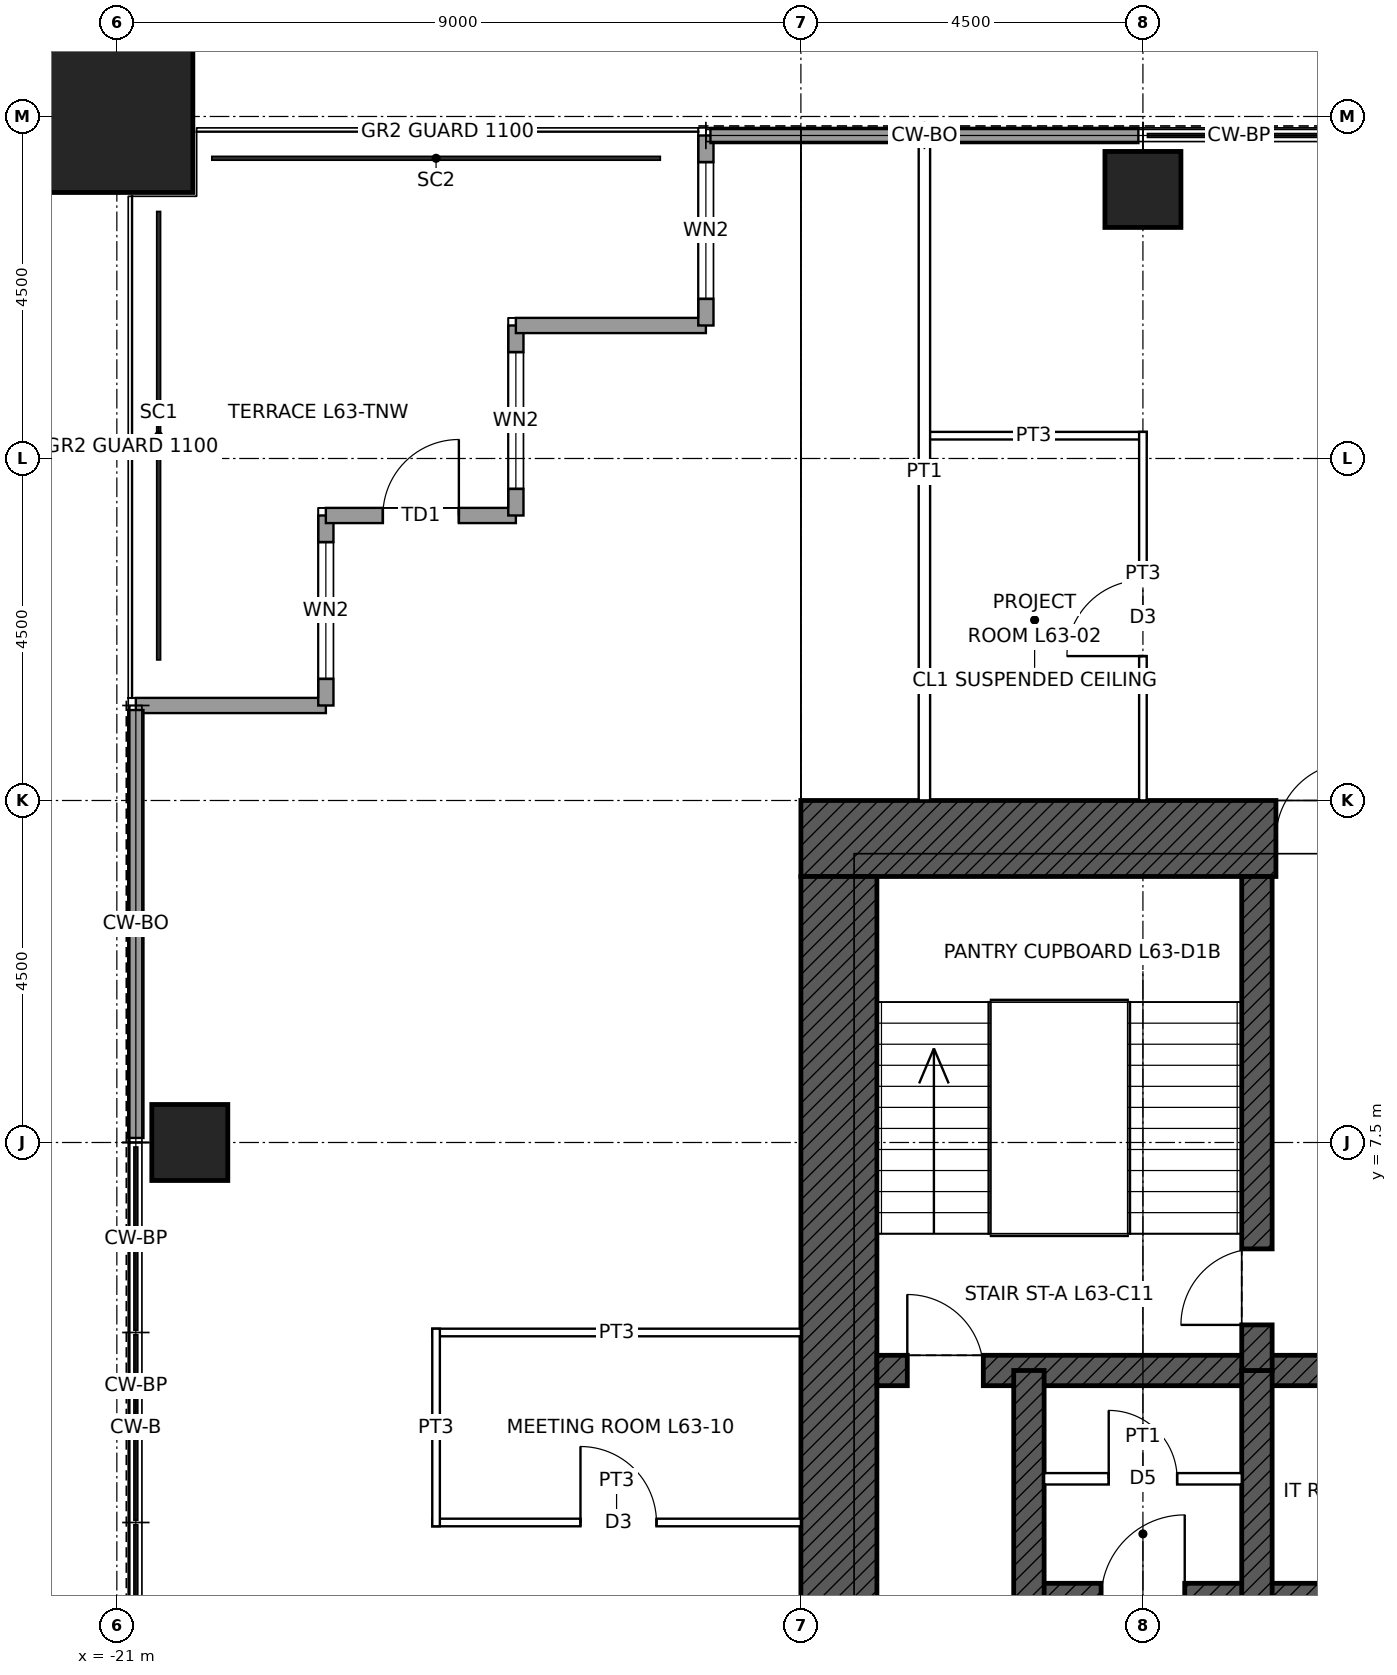
"""IFC4 building model, lengths in metres.
Left out: names, types, materials, properties, quantities, classifications, styles, units other than length and angle.
Written with IfcOpenShell. Run it as: python <this file> out.ifc"""

import sys

from ifc_helpers import new_model, si_unit, direction, frame, frame_2d, origin, origin_2d, place, context, subcontext, project, spatial, rectangle, hollow_rectangle, extrude, element, fill, save


model = new_model("IFC4")
c1 = context("Model", 3, precision=1e-05, world=origin(), true_north=direction((0.0, 1.0)))
c2 = subcontext(c1, "Body", "Model", "MODEL_VIEW")
j1 = project(units=[si_unit("LENGTHUNIT", "METRE"), si_unit("PLANEANGLEUNIT", "RADIAN")], contexts=[c1])
p1 = place(None, origin())
s1 = spatial("IfcSite", under=j1, at=p1, CompositionType="ELEMENT")
p2 = place(p1, origin())
s2 = spatial("IfcBuilding", under=s1, at=p2, CompositionType="ELEMENT")
p3 = place(p2, frame((0.0, 0.0, 287.9)))
s3 = spatial("IfcBuildingStorey", under=s2, at=p3, CompositionType="ELEMENT", Elevation=287.9)
p4 = place(p3, frame((-21.0, 21.0, 0.0), z_axis=(0.0, 0.0, 1.0), x_axis=(1.0, 0.0, 0.0)))
e1 = element("IfcColumn", 1, at=p4, inside=s3, PredefinedType="COLUMN", context=c2, shape_type="SweptSolid", body=[
    extrude(hollow_rectangle(XDim=2.0, YDim=2.0, WallThickness=0.095, at=origin_2d()), origin(), (0.0, 0.0, 1.0), 4.0),
])
for number, where, z_axis, x_axis in (
    (2, (-7.5, 20.04, 0.0), (0.0, 0.0, 1.0), (1.0, 0.0, 0.0)),
    (3, (-20.04, 7.5, 0.0), (0.0, 0.0, 1.0), (1.0, 0.0, 0.0)),
):
    element("IfcColumn", number, at=place(p3, frame(where, z_axis=z_axis, x_axis=x_axis)), inside=s3, PredefinedType="COLUMN", context=c2, shape_type="SweptSolid", body=[
        extrude(hollow_rectangle(XDim=1.0, YDim=1.0, WallThickness=0.075, at=origin_2d()), origin(), (0.0, 0.0, 1.0), 4.0),
    ])
p5 = place(p3, frame((-12.0, 11.5, 0.0), z_axis=(0.0, 0.0, 1.0), x_axis=(1.0, 0.0, 0.0)))
e4 = element("IfcWall", 4, at=p5, inside=s3, PredefinedType="SHEAR", context=c2, shape_type="SweptSolid", body=[
    extrude(rectangle(XDim=24.0, YDim=1.0, at=frame_2d((12.0, 0.0))), origin(), (0.0, 0.0, 1.0), 4.0),
])
p6 = place(p5, frame((6.25, 0.0, 0.0)))
e5 = element("IfcOpeningElement", 5, at=p6, cuts=e4, PredefinedType="OPENING", context=c2, shape_type="SweptSolid", body=[
    extrude(rectangle(XDim=1.0, YDim=2.4, at=frame_2d((0.5, 1.2))), frame((0.0, 0.51, 0.0), z_axis=(0.0, -1.0, 0.0), x_axis=(1.0, 0.0, 0.0)), (0.0, 0.0, 1.0), 1.02),
])
p7 = place(p5, frame((16.75, 0.0, 0.0)))
e6 = element("IfcOpeningElement", 6, at=p7, cuts=e4, PredefinedType="OPENING", context=c2, shape_type="SweptSolid", body=[
    extrude(rectangle(XDim=1.0, YDim=2.4, at=frame_2d((0.5, 1.2))), frame((0.0, 0.51, 0.0), z_axis=(0.0, -1.0, 0.0), x_axis=(1.0, 0.0, 0.0)), (0.0, 0.0, 1.0), 1.02),
])
p8 = place(p3, frame((-11.5, -11.0, 0.0), z_axis=(0.0, 0.0, 1.0), x_axis=(0.0, 1.0, 0.0)))
e7 = element("IfcWall", 7, at=p8, inside=s3, PredefinedType="SHEAR", context=c2, shape_type="SweptSolid", body=[
    extrude(rectangle(XDim=22.0, YDim=1.0, at=frame_2d((11.0, 0.0))), origin(), (0.0, 0.0, 1.0), 4.0),
])
p9 = place(p8, frame((10.5, 0.0, 0.0)))
e8 = element("IfcOpeningElement", 8, at=p9, cuts=e7, PredefinedType="OPENING", context=c2, shape_type="SweptSolid", body=[
    extrude(rectangle(XDim=1.0, YDim=2.4, at=frame_2d((0.5, 1.2))), frame((0.0, 0.51, 0.0), z_axis=(0.0, -1.0, 0.0), x_axis=(1.0, 0.0, 0.0)), (0.0, 0.0, 1.0), 1.02),
])
p10 = place(p3, frame((-11.0, 4.5, 0.0), z_axis=(0.0, 0.0, 1.0), x_axis=(1.0, 0.0, 0.0)))
e9 = element("IfcWall", 9, at=p10, inside=s3, PredefinedType="SHEAR", context=c2, shape_type="SweptSolid", body=[
    extrude(rectangle(XDim=22.0, YDim=0.4, at=frame_2d((11.0, 0.0))), origin(), (0.0, 0.0, 1.0), 4.0),
])
p11 = place(p10, frame((0.4, 0.0, 0.0)))
e10 = element("IfcOpeningElement", 10, at=p11, cuts=e9, PredefinedType="OPENING", context=c2, shape_type="SweptSolid", body=[
    extrude(rectangle(XDim=1.0, YDim=2.1, at=frame_2d((0.5, 1.05))), frame((0.0, 0.21, 0.0), z_axis=(0.0, -1.0, 0.0), x_axis=(1.0, 0.0, 0.0)), (0.0, 0.0, 1.0), 0.42),
])
p12 = place(p10, frame((20.6, 0.0, 0.0)))
e11 = element("IfcOpeningElement", 11, at=p12, cuts=e9, PredefinedType="OPENING", context=c2, shape_type="SweptSolid", body=[
    extrude(rectangle(XDim=1.0, YDim=2.1, at=frame_2d((0.5, 1.05))), frame((0.0, 0.21, 0.0), z_axis=(0.0, -1.0, 0.0), x_axis=(1.0, 0.0, 0.0)), (0.0, 0.0, 1.0), 0.42),
])
p13 = place(p3, frame((-9.0, 1.5, 0.0), z_axis=(0.0, 0.0, 1.0), x_axis=(1.0, 0.0, 0.0)))
e12 = element("IfcWall", 12, at=p13, inside=s3, PredefinedType="SHEAR", context=c2, shape_type="SweptSolid", body=[
    extrude(rectangle(XDim=18.0, YDim=0.4, at=frame_2d((9.0, 0.0))), origin(), (0.0, 0.0, 1.0), 4.0),
])
p14 = place(p13, frame((0.95, 0.0, 0.0)))
e13 = element("IfcOpeningElement", 13, at=p14, cuts=e12, PredefinedType="OPENING", context=c2, shape_type="SweptSolid", body=[
    extrude(rectangle(XDim=1.1, YDim=2.1, at=frame_2d((0.55, 1.05))), frame((0.0, 0.21, 0.0), z_axis=(0.0, -1.0, 0.0), x_axis=(1.0, 0.0, 0.0)), (0.0, 0.0, 1.0), 0.42),
])
p15 = place(p13, frame((3.95, 0.0, 0.0)))
e14 = element("IfcOpeningElement", 14, at=p15, cuts=e12, PredefinedType="OPENING", context=c2, shape_type="SweptSolid", body=[
    extrude(rectangle(XDim=1.1, YDim=2.1, at=frame_2d((0.55, 1.05))), frame((0.0, 0.21, 0.0), z_axis=(0.0, -1.0, 0.0), x_axis=(1.0, 0.0, 0.0)), (0.0, 0.0, 1.0), 0.42),
])
p16 = place(p13, frame((6.95, 0.0, 0.0)))
e15 = element("IfcOpeningElement", 15, at=p16, cuts=e12, PredefinedType="OPENING", context=c2, shape_type="SweptSolid", body=[
    extrude(rectangle(XDim=1.1, YDim=2.1, at=frame_2d((0.55, 1.05))), frame((0.0, 0.21, 0.0), z_axis=(0.0, -1.0, 0.0), x_axis=(1.0, 0.0, 0.0)), (0.0, 0.0, 1.0), 0.42),
])
p17 = place(p13, frame((9.95, 0.0, 0.0)))
e16 = element("IfcOpeningElement", 16, at=p17, cuts=e12, PredefinedType="OPENING", context=c2, shape_type="SweptSolid", body=[
    extrude(rectangle(XDim=1.1, YDim=2.1, at=frame_2d((0.55, 1.05))), frame((0.0, 0.21, 0.0), z_axis=(0.0, -1.0, 0.0), x_axis=(1.0, 0.0, 0.0)), (0.0, 0.0, 1.0), 0.42),
])
p18 = place(p13, frame((12.95, 0.0, 0.0)))
e17 = element("IfcOpeningElement", 17, at=p18, cuts=e12, PredefinedType="OPENING", context=c2, shape_type="SweptSolid", body=[
    extrude(rectangle(XDim=1.1, YDim=2.1, at=frame_2d((0.55, 1.05))), frame((0.0, 0.21, 0.0), z_axis=(0.0, -1.0, 0.0), x_axis=(1.0, 0.0, 0.0)), (0.0, 0.0, 1.0), 0.42),
])
p19 = place(p13, frame((15.95, 0.0, 0.0)))
e18 = element("IfcOpeningElement", 18, at=p19, cuts=e12, PredefinedType="OPENING", context=c2, shape_type="SweptSolid", body=[
    extrude(rectangle(XDim=1.1, YDim=2.1, at=frame_2d((0.55, 1.05))), frame((0.0, 0.21, 0.0), z_axis=(0.0, -1.0, 0.0), x_axis=(1.0, 0.0, 0.0)), (0.0, 0.0, 1.0), 0.42),
])
for number, where, z_axis, x_axis in (
    (19, (-9.0, 1.5, 0.0), (0.0, 0.0, 1.0), (0.0, 1.0, 0.0)),
    (20, (-6.0, 1.5, 0.0), (0.0, 0.0, 1.0), (0.0, 1.0, 0.0)),
):
    element("IfcWall", number, at=place(p3, frame(where, z_axis=z_axis, x_axis=x_axis)), inside=s3, PredefinedType="SHEAR", context=c2, shape_type="SweptSolid", body=[
        extrude(rectangle(XDim=3.0, YDim=0.4, at=frame_2d((1.5, 0.0))), origin(), (0.0, 0.0, 1.0), 4.0),
    ])
p20 = place(p3, frame((-6.0, 4.5, 0.0), z_axis=(0.0, 0.0, 1.0), x_axis=(0.0, 1.0, 0.0)))
e21 = element("IfcWall", 21, at=p20, inside=s3, PredefinedType="SHEAR", context=c2, shape_type="SweptSolid", body=[
    extrude(rectangle(XDim=6.5, YDim=0.4, at=frame_2d((3.25, 0.0))), origin(), (0.0, 0.0, 1.0), 4.0),
])
p21 = place(p20, frame((0.6, 0.0, 0.0)))
e22 = element("IfcOpeningElement", 22, at=p21, cuts=e21, PredefinedType="OPENING", context=c2, shape_type="SweptSolid", body=[
    extrude(rectangle(XDim=1.0, YDim=2.1, at=frame_2d((0.5, 1.05))), frame((0.0, 0.21, 0.0), z_axis=(0.0, -1.0, 0.0), x_axis=(1.0, 0.0, 0.0)), (0.0, 0.0, 1.0), 0.42),
])
p22 = place(p3, frame((-20.75, 13.25, 0.0), z_axis=(0.0, 0.0, 1.0), x_axis=(1.0, 0.0, 0.0)))
e23 = element("IfcWall", 23, at=p22, inside=s3, PredefinedType="SOLIDWALL", context=c2, shape_type="SweptSolid", body=[
    extrude(rectangle(XDim=2.5, YDim=0.2, at=frame_2d((1.25, 0.0))), origin(), (0.0, 0.0, 1.0), 3.85),
])
p23 = place(p3, frame((-18.25, 13.25, 0.0), z_axis=(0.0, 0.0, 1.0), x_axis=(0.0, 1.0, 0.0)))
e24 = element("IfcWall", 24, at=p23, inside=s3, PredefinedType="SOLIDWALL", context=c2, shape_type="SweptSolid", body=[
    extrude(rectangle(XDim=2.5, YDim=0.2, at=frame_2d((1.25, 0.0))), origin(), (0.0, 0.0, 1.0), 3.85),
])
p24 = place(p23, frame((0.35, 0.0, 0.3)))
e25 = element("IfcOpeningElement", 25, at=p24, cuts=e24, PredefinedType="OPENING", context=c2, shape_type="SweptSolid", body=[
    extrude(rectangle(XDim=1.8, YDim=2.4, at=frame_2d((0.9, 1.2))), frame((0.0, 0.11, 0.0), z_axis=(0.0, -1.0, 0.0), x_axis=(1.0, 0.0, 0.0)), (0.0, 0.0, 1.0), 0.22),
])
p25 = place(p3, frame((-18.25, 15.75, 0.0), z_axis=(0.0, 0.0, 1.0), x_axis=(1.0, 0.0, 0.0)))
e26 = element("IfcWall", 26, at=p25, inside=s3, PredefinedType="SOLIDWALL", context=c2, shape_type="SweptSolid", body=[
    extrude(rectangle(XDim=2.5, YDim=0.2, at=frame_2d((1.25, 0.0))), origin(), (0.0, 0.0, 1.0), 3.317),
])
p26 = place(p25, frame((0.75, 0.0, 0.0)))
e27 = element("IfcOpeningElement", 27, at=p26, cuts=e26, PredefinedType="OPENING", context=c2, shape_type="SweptSolid", body=[
    extrude(rectangle(XDim=1.0, YDim=2.4, at=frame_2d((0.5, 1.2))), frame((0.0, 0.11, 0.0), z_axis=(0.0, -1.0, 0.0), x_axis=(1.0, 0.0, 0.0)), (0.0, 0.0, 1.0), 0.22),
])
p27 = place(p3, frame((-15.75, 15.75, 0.0), z_axis=(0.0, 0.0, 1.0), x_axis=(0.0, 1.0, 0.0)))
e28 = element("IfcWall", 28, at=p27, inside=s3, PredefinedType="SOLIDWALL", context=c2, shape_type="SweptSolid", body=[
    extrude(rectangle(XDim=2.5, YDim=0.2, at=frame_2d((1.25, 0.0))), origin(), (0.0, 0.0, 1.0), 3.85),
])
p28 = place(p27, frame((0.35, 0.0, 0.3)))
e29 = element("IfcOpeningElement", 29, at=p28, cuts=e28, PredefinedType="OPENING", context=c2, shape_type="SweptSolid", body=[
    extrude(rectangle(XDim=1.8, YDim=2.4, at=frame_2d((0.9, 1.2))), frame((0.0, 0.11, 0.0), z_axis=(0.0, -1.0, 0.0), x_axis=(1.0, 0.0, 0.0)), (0.0, 0.0, 1.0), 0.22),
])
p29 = place(p3, frame((-15.75, 18.25, 0.0), z_axis=(0.0, 0.0, 1.0), x_axis=(1.0, 0.0, 0.0)))
e30 = element("IfcWall", 30, at=p29, inside=s3, PredefinedType="SOLIDWALL", context=c2, shape_type="SweptSolid", body=[
    extrude(rectangle(XDim=2.5, YDim=0.2, at=frame_2d((1.25, 0.0))), origin(), (0.0, 0.0, 1.0), 3.85),
])
p30 = place(p3, frame((-13.25, 18.25, 0.0), z_axis=(0.0, 0.0, 1.0), x_axis=(0.0, 1.0, 0.0)))
e31 = element("IfcWall", 31, at=p30, inside=s3, PredefinedType="SOLIDWALL", context=c2, shape_type="SweptSolid", body=[
    extrude(rectangle(XDim=2.5, YDim=0.2, at=frame_2d((1.25, 0.0))), origin(), (0.0, 0.0, 1.0), 3.85),
])
p31 = place(p30, frame((0.35, 0.0, 0.3)))
e32 = element("IfcOpeningElement", 32, at=p31, cuts=e31, PredefinedType="OPENING", context=c2, shape_type="SweptSolid", body=[
    extrude(rectangle(XDim=1.8, YDim=2.4, at=frame_2d((0.9, 1.2))), frame((0.0, 0.11, 0.0), z_axis=(0.0, -1.0, 0.0), x_axis=(1.0, 0.0, 0.0)), (0.0, 0.0, 1.0), 0.22),
])
for number, where, z_axis, x_axis in (
    (33, (-13.19, 20.75, 0.0), (0.0, 0.0, 1.0), (1.0, 0.0, 0.0)),
    (34, (-10.345, 20.75, 0.0), (0.0, 0.0, 1.0), (1.0, 0.0, 0.0)),
    (35, (-20.75, 7.56, 0.0), (0.0, 0.0, 1.0), (0.0, 1.0, 0.0)),
    (36, (-20.75, 10.405, 0.0), (0.0, 0.0, 1.0), (0.0, 1.0, 0.0)),
):
    element("IfcWall", number, at=place(p3, frame(where, z_axis=z_axis, x_axis=x_axis)), inside=s3, PredefinedType="SOLIDWALL", context=c2, shape_type="SweptSolid", body=[
        extrude(rectangle(XDim=2.785, YDim=0.2, at=frame_2d((1.393, 0.0))), origin(), (0.0, 0.0, 1.0), 3.85),
    ])
p32 = place(p3, frame((-16.85, 2.5, 0.0), z_axis=(0.0, 0.0, 1.0), x_axis=(1.0, 0.0, 0.0)))
e37 = element("IfcWall", 37, at=p32, inside=s3, PredefinedType="PARTITIONING", context=c2, shape_type="SweptSolid", body=[
    extrude(rectangle(XDim=4.85, YDim=0.1, at=frame_2d((2.425, 0.0))), origin(), (0.0, 0.0, 1.0), 3.85),
])
p33 = place(p32, frame((1.95, 0.0, 0.0)))
e38 = element("IfcOpeningElement", 38, at=p33, cuts=e37, PredefinedType="OPENING", context=c2, shape_type="SweptSolid", body=[
    extrude(rectangle(XDim=1.0, YDim=2.1, at=frame_2d((0.5, 1.05))), frame((0.0, 0.06, 0.0), z_axis=(0.0, -1.0, 0.0), x_axis=(1.0, 0.0, 0.0)), (0.0, 0.0, 1.0), 0.12),
])
p34 = place(p3, frame((-16.85, 5.0, 0.0), z_axis=(0.0, 0.0, 1.0), x_axis=(1.0, 0.0, 0.0)))
e39 = element("IfcWall", 39, at=p34, inside=s3, PredefinedType="PARTITIONING", context=c2, shape_type="SweptSolid", body=[
    extrude(rectangle(XDim=4.85, YDim=0.1, at=frame_2d((2.425, 0.0))), origin(), (0.0, 0.0, 1.0), 3.85),
])
p35 = place(p3, frame((-10.425, 16.8, 0.0), z_axis=(0.0, 0.0, 1.0), x_axis=(1.0, 0.0, 0.0)))
e40 = element("IfcWall", 40, at=p35, inside=s3, PredefinedType="PARTITIONING", context=c2, shape_type="SweptSolid", body=[
    extrude(rectangle(XDim=2.975, YDim=0.1, at=frame_2d((1.488, 0.0))), origin(), (0.0, 0.0, 1.0), 3.85),
])
p36 = place(p3, frame((-16.8, 2.45, 0.0), z_axis=(0.0, 0.0, 1.0), x_axis=(0.0, 1.0, 0.0)))
e41 = element("IfcWall", 41, at=p36, inside=s3, PredefinedType="PARTITIONING", context=c2, shape_type="SweptSolid", body=[
    extrude(rectangle(XDim=2.6, YDim=0.1, at=frame_2d((1.3, 0.0))), origin(), (0.0, 0.0, 1.0), 3.85),
])
p37 = place(p3, frame((-10.375, 12.0, 0.0), z_axis=(0.0, 0.0, 1.0), x_axis=(0.0, 1.0, 0.0)))
e42 = element("IfcWall", 42, at=p37, inside=s3, PredefinedType="PARTITIONING", context=c2, shape_type="SweptSolid", body=[
    extrude(rectangle(XDim=8.65, YDim=0.15, at=frame_2d((4.325, 0.0))), origin(), (0.0, 0.0, 1.0), 3.85),
])
p38 = place(p3, frame((-7.5, 12.0, 0.0), z_axis=(0.0, 0.0, 1.0), x_axis=(0.0, 1.0, 0.0)))
e43 = element("IfcWall", 43, at=p38, inside=s3, PredefinedType="PARTITIONING", context=c2, shape_type="SweptSolid", body=[
    extrude(rectangle(XDim=4.85, YDim=0.1, at=frame_2d((2.425, 0.0))), origin(), (0.0, 0.0, 1.0), 3.243),
])
p39 = place(p38, frame((1.9, 0.0, 0.0)))
e44 = element("IfcOpeningElement", 44, at=p39, cuts=e43, PredefinedType="OPENING", context=c2, shape_type="SweptSolid", body=[
    extrude(rectangle(XDim=1.0, YDim=2.1, at=frame_2d((0.5, 1.05))), frame((0.0, 0.06, 0.0), z_axis=(0.0, -1.0, 0.0), x_axis=(1.0, 0.0, 0.0)), (0.0, 0.0, 1.0), 0.12),
])
p40 = place(p3, frame((-8.8, 3.075, 0.0), z_axis=(0.0, 0.0, 1.0), x_axis=(1.0, 0.0, 0.0)))
e45 = element("IfcWall", 45, at=p40, inside=s3, PredefinedType="PARTITIONING", context=c2, shape_type="SweptSolid", body=[
    extrude(rectangle(XDim=2.6, YDim=0.15, at=frame_2d((1.3, 0.0))), origin(), (0.0, 0.0, 1.0), 3.75),
])
p41 = place(p40, frame((0.85, 0.0, 0.0)))
e46 = element("IfcOpeningElement", 46, at=p41, cuts=e45, PredefinedType="OPENING", context=c2, shape_type="SweptSolid", body=[
    extrude(rectangle(XDim=0.9, YDim=2.1, at=frame_2d((0.45, 1.05))), frame((0.0, 0.085, 0.0), z_axis=(0.0, -1.0, 0.0), x_axis=(1.0, 0.0, 0.0)), (0.0, 0.0, 1.0), 0.17),
])
p42 = place(p24, origin())
e47 = element("IfcWindow", 47, at=p42, inside=s3, PartitioningType="SINGLE_PANEL", PredefinedType="WINDOW", context=c2, shape_type="SweptSolid", body=[
    extrude(rectangle(XDim=1.8, YDim=2.4, at=frame_2d((0.9, 1.2))), frame((0.0, 0.03, 0.0), z_axis=(0.0, -1.0, 0.0), x_axis=(1.0, 0.0, 0.0)), (0.0, 0.0, 1.0), 0.06),
])
fill(e25, e47)
p43 = place(p26, origin())
e48 = element("IfcDoor", 48, at=p43, inside=s3, OperationType="SINGLE_SWING_RIGHT", PredefinedType="DOOR", context=c2, shape_type="SweptSolid", body=[
    extrude(rectangle(XDim=1.0, YDim=2.4, at=frame_2d((0.5, 1.2))), frame((0.0, 0.025, 0.0), z_axis=(0.0, -1.0, 0.0), x_axis=(1.0, 0.0, 0.0)), (0.0, 0.0, 1.0), 0.05),
])
fill(e27, e48)
p44 = place(p28, origin())
e49 = element("IfcWindow", 49, at=p44, inside=s3, PartitioningType="SINGLE_PANEL", PredefinedType="WINDOW", context=c2, shape_type="SweptSolid", body=[
    extrude(rectangle(XDim=1.8, YDim=2.4, at=frame_2d((0.9, 1.2))), frame((0.0, 0.03, 0.0), z_axis=(0.0, -1.0, 0.0), x_axis=(1.0, 0.0, 0.0)), (0.0, 0.0, 1.0), 0.06),
])
fill(e29, e49)
p45 = place(p31, origin())
e50 = element("IfcWindow", 50, at=p45, inside=s3, PartitioningType="SINGLE_PANEL", PredefinedType="WINDOW", context=c2, shape_type="SweptSolid", body=[
    extrude(rectangle(XDim=1.8, YDim=2.4, at=frame_2d((0.9, 1.2))), frame((0.0, 0.03, 0.0), z_axis=(0.0, -1.0, 0.0), x_axis=(1.0, 0.0, 0.0)), (0.0, 0.0, 1.0), 0.06),
])
fill(e32, e50)
p46 = place(p11, origin())
e51 = element("IfcDoor", 51, at=p46, inside=s3, OperationType="SINGLE_SWING_LEFT", PredefinedType="DOOR", context=c2, shape_type="SweptSolid", body=[
    extrude(rectangle(XDim=1.0, YDim=2.1, at=frame_2d((0.5, 1.05))), frame((0.0, 0.025, 0.0), z_axis=(0.0, -1.0, 0.0), x_axis=(1.0, 0.0, 0.0)), (0.0, 0.0, 1.0), 0.05),
])
fill(e10, e51)
p47 = place(p21, origin())
e52 = element("IfcDoor", 52, at=p47, inside=s3, OperationType="SINGLE_SWING_LEFT", PredefinedType="DOOR", context=c2, shape_type="SweptSolid", body=[
    extrude(rectangle(XDim=1.0, YDim=2.1, at=frame_2d((0.5, 1.05))), frame((0.0, 0.025, 0.0), z_axis=(0.0, -1.0, 0.0), x_axis=(1.0, 0.0, 0.0)), (0.0, 0.0, 1.0), 0.05),
])
fill(e22, e52)
p48 = place(p6, origin())
e53 = element("IfcDoor", 53, at=p48, inside=s3, OperationType="SINGLE_SWING_RIGHT", PredefinedType="DOOR", context=c2, shape_type="SweptSolid", body=[
    extrude(rectangle(XDim=1.0, YDim=2.4, at=frame_2d((0.5, 1.2))), frame((0.0, 0.485, 0.0), z_axis=(0.0, -1.0, 0.0), x_axis=(1.0, 0.0, 0.0)), (0.0, 0.0, 1.0), 0.05),
])
fill(e5, e53)
p49 = place(p41, origin())
e54 = element("IfcDoor", 54, at=p49, inside=s3, OperationType="SINGLE_SWING_LEFT", PredefinedType="DOOR", context=c2, shape_type="SweptSolid", body=[
    extrude(rectangle(XDim=0.9, YDim=2.1, at=frame_2d((0.45, 1.05))), frame((0.0, 0.025, 0.0), z_axis=(0.0, -1.0, 0.0), x_axis=(1.0, 0.0, 0.0)), (0.0, 0.0, 1.0), 0.05),
])
fill(e46, e54)
p50 = place(p39, origin())
e55 = element("IfcDoor", 55, at=p50, inside=s3, OperationType="SINGLE_SWING_LEFT", PredefinedType="DOOR", context=c2, shape_type="SweptSolid", body=[
    extrude(rectangle(XDim=1.0, YDim=2.1, at=frame_2d((0.5, 1.05))), frame((0.0, 0.025, 0.0), z_axis=(0.0, -1.0, 0.0), x_axis=(1.0, 0.0, 0.0)), (0.0, 0.0, 1.0), 0.05),
])
fill(e44, e55)
p51 = place(p33, origin())
e56 = element("IfcDoor", 56, at=p51, inside=s3, OperationType="SINGLE_SWING_LEFT", PredefinedType="DOOR", context=c2, shape_type="SweptSolid", body=[
    extrude(rectangle(XDim=1.0, YDim=2.1, at=frame_2d((0.5, 1.05))), frame((0.0, 0.025, 0.0), z_axis=(0.0, -1.0, 0.0), x_axis=(1.0, 0.0, 0.0)), (0.0, 0.0, 1.0), 0.05),
])
fill(e38, e56)
save(model, sys.argv[1])
